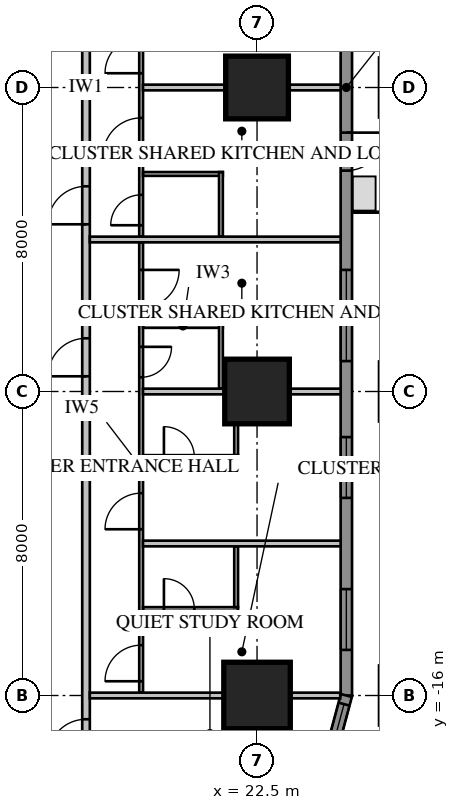
"""IFC4 building model, lengths in metres.
Left out: names, types, materials, properties, quantities, classifications, styles, units other than length and angle.
Written with IfcOpenShell. Run it as: python <this file> out.ifc"""

import sys

from ifc_helpers import new_model, si_unit, direction, frame, frame_2d, origin, origin_2d, place, context, subcontext, project, spatial, rectangle, extrude, element, fill, save


model = new_model("IFC4")
c1 = context("Model", 3, precision=1e-05, world=origin(), true_north=direction((0.0, 1.0)))
c2 = subcontext(c1, "Body", "Model", "MODEL_VIEW")
j1 = project(units=[si_unit("LENGTHUNIT", "METRE"), si_unit("PLANEANGLEUNIT", "RADIAN")], contexts=[c1])
p1 = place(None, origin())
s1 = spatial("IfcSite", under=j1, at=p1, CompositionType="ELEMENT")
p2 = place(p1, origin())
s2 = spatial("IfcBuilding", under=s1, at=p2, CompositionType="ELEMENT")
p3 = place(p2, frame((0.0, 0.0, 46.8)))
s3 = spatial("IfcBuildingStorey", under=s2, at=p3, CompositionType="ELEMENT", Elevation=46.8)
p4 = place(p3, frame((22.5, -16.0, 0.0), z_axis=(0.0, 0.0, 1.0), x_axis=(1.0, 0.0, 0.0)))
e1 = element("IfcColumn", 1, at=p4, inside=s3, PredefinedType="COLUMN", context=c2, shape_type="SweptSolid", body=[
    extrude(rectangle(XDim=1.75, YDim=1.75, at=origin_2d()), origin(), (0.0, 0.0, 1.0), 3.85),
])
p5 = place(p3, frame((22.5, -8.0, 0.0), z_axis=(0.0, 0.0, 1.0), x_axis=(1.0, 0.0, 0.0)))
e2 = element("IfcColumn", 2, at=p5, inside=s3, PredefinedType="COLUMN", context=c2, shape_type="SweptSolid", body=[
    extrude(rectangle(XDim=1.7, YDim=1.7, at=origin_2d()), origin(), (0.0, 0.0, 1.0), 3.85),
])
p6 = place(p3, frame((22.5, 0.0, 0.0), z_axis=(0.0, 0.0, 1.0), x_axis=(1.0, 0.0, 0.0)))
e3 = element("IfcColumn", 3, at=p6, inside=s3, PredefinedType="COLUMN", context=c2, shape_type="SweptSolid", body=[
    extrude(rectangle(XDim=1.65, YDim=1.65, at=origin_2d()), origin(), (0.0, 0.0, 1.0), 3.85),
])
p7 = place(p3, frame((24.85, -16.0, 0.0), z_axis=(0.0, 0.0, 1.0), x_axis=(0.0, 1.0, 0.0)))
e4 = element("IfcWall", 4, at=p7, inside=s3, PredefinedType="SOLIDWALL", context=c2, shape_type="SweptSolid", body=[
    extrude(rectangle(XDim=32.0, YDim=0.3, at=frame_2d((16.0, 0.0))), origin(), (0.0, 0.0, 1.0), 3.65),
])
p8 = place(p7, frame((1.2, 0.0, 0.75)))
e5 = element("IfcOpeningElement", 5, at=p8, cuts=e4, PredefinedType="OPENING", context=c2, shape_type="SweptSolid", body=[
    extrude(rectangle(XDim=1.6, YDim=1.8, at=frame_2d((0.8, 0.9))), frame((0.0, 0.17, 0.0), z_axis=(0.0, -1.0, 0.0), x_axis=(1.0, 0.0, 0.0)), (0.0, 0.0, 1.0), 0.34),
])
p9 = place(p7, frame((5.2, 0.0, 0.75)))
e6 = element("IfcOpeningElement", 6, at=p9, cuts=e4, PredefinedType="OPENING", context=c2, shape_type="SweptSolid", body=[
    extrude(rectangle(XDim=1.6, YDim=1.8, at=frame_2d((0.8, 0.9))), frame((0.0, 0.17, 0.0), z_axis=(0.0, -1.0, 0.0), x_axis=(1.0, 0.0, 0.0)), (0.0, 0.0, 1.0), 0.34),
])
p10 = place(p7, frame((17.2, 0.0, 0.75)))
e7 = element("IfcOpeningElement", 7, at=p10, cuts=e4, PredefinedType="OPENING", context=c2, shape_type="SweptSolid", body=[
    extrude(rectangle(XDim=1.6, YDim=1.8, at=frame_2d((0.8, 0.9))), frame((0.0, 0.17, 0.0), z_axis=(0.0, -1.0, 0.0), x_axis=(1.0, 0.0, 0.0)), (0.0, 0.0, 1.0), 0.34),
])
p11 = place(p7, frame((21.2, 0.0, 0.75)))
e8 = element("IfcOpeningElement", 8, at=p11, cuts=e4, PredefinedType="OPENING", context=c2, shape_type="SweptSolid", body=[
    extrude(rectangle(XDim=1.6, YDim=1.8, at=frame_2d((0.8, 0.9))), frame((0.0, 0.17, 0.0), z_axis=(0.0, -1.0, 0.0), x_axis=(1.0, 0.0, 0.0)), (0.0, 0.0, 1.0), 0.34),
])
p12 = place(p7, frame((25.2, 0.0, 0.75)))
e9 = element("IfcOpeningElement", 9, at=p12, cuts=e4, PredefinedType="OPENING", context=c2, shape_type="SweptSolid", body=[
    extrude(rectangle(XDim=1.6, YDim=1.8, at=frame_2d((0.8, 0.9))), frame((0.0, 0.17, 0.0), z_axis=(0.0, -1.0, 0.0), x_axis=(1.0, 0.0, 0.0)), (0.0, 0.0, 1.0), 0.34),
])
p13 = place(p7, frame((29.2, 0.0, 0.75)))
e10 = element("IfcOpeningElement", 10, at=p13, cuts=e4, PredefinedType="OPENING", context=c2, shape_type="SweptSolid", body=[
    extrude(rectangle(XDim=1.6, YDim=1.8, at=frame_2d((0.8, 0.9))), frame((0.0, 0.17, 0.0), z_axis=(0.0, -1.0, 0.0), x_axis=(1.0, 0.0, 0.0)), (0.0, 0.0, 1.0), 0.34),
])
p14 = place(p7, frame((8.8, 0.0, 0.75)))
e11 = element("IfcOpeningElement", 11, at=p14, cuts=e4, PredefinedType="OPENING", context=c2, shape_type="SweptSolid", body=[
    extrude(rectangle(XDim=2.4, YDim=1.8, at=frame_2d((1.2, 0.9))), frame((0.0, 0.17, 0.0), z_axis=(0.0, -1.0, 0.0), x_axis=(1.0, 0.0, 0.0)), (0.0, 0.0, 1.0), 0.34),
])
p15 = place(p7, frame((13.812, 0.0, 0.0)))
e12 = element("IfcOpeningElement", 12, at=p15, cuts=e4, PredefinedType="OPENING", context=c2, shape_type="SweptSolid", body=[
    extrude(rectangle(XDim=1.0, YDim=2.4, at=frame_2d((0.5, 1.2))), frame((0.0, 0.17, 0.0), z_axis=(0.0, -1.0, 0.0), x_axis=(1.0, 0.0, 0.0)), (0.0, 0.0, 1.0), 0.34),
])
p16 = place(p3, frame((23.664, -20.425, 0.0), z_axis=(0.0, 0.0, 1.0), x_axis=(0.258839972501, 0.965920218567, 0.0)))
e13 = element("IfcWall", 13, at=p16, inside=s3, PredefinedType="SOLIDWALL", context=c2, shape_type="SweptSolid", body=[
    extrude(rectangle(XDim=4.581, YDim=0.3, at=frame_2d((2.291, 0.0))), origin(), (0.0, 0.0, 1.0), 3.65),
])
p17 = place(p16, frame((2.746, 0.0, 0.75)))
e14 = element("IfcOpeningElement", 14, at=p17, cuts=e13, PredefinedType="OPENING", context=c2, shape_type="SweptSolid", body=[
    extrude(rectangle(XDim=1.6, YDim=1.8, at=frame_2d((0.8, 0.9))), frame((0.0, 0.17, 0.0), z_axis=(0.0, -1.0, 0.0), x_axis=(1.0, 0.0, 0.0)), (0.0, 0.0, 1.0), 0.34),
])
p18 = place(p3, frame((18.0, -18.0, 0.0), z_axis=(0.0, 0.0, 1.0), x_axis=(0.0, 1.0, 0.0)))
e15 = element("IfcWall", 15, at=p18, inside=s3, PredefinedType="PARTITIONING", context=c2, shape_type="SweptSolid", body=[
    extrude(rectangle(XDim=36.0, YDim=0.2, at=frame_2d((18.0, 0.0))), origin(), (0.0, 0.0, 1.0), 3.65),
])
p19 = place(p18, frame((10.4, 0.0, 0.0)))
e16 = element("IfcOpeningElement", 16, at=p19, cuts=e15, PredefinedType="OPENING", context=c2, shape_type="SweptSolid", body=[
    extrude(rectangle(XDim=1.0, YDim=2.1, at=frame_2d((0.5, 1.05))), frame((0.0, 0.12, 0.0), z_axis=(0.0, -1.0, 0.0), x_axis=(1.0, 0.0, 0.0)), (0.0, 0.0, 1.0), 0.24),
])
p20 = place(p18, frame((14.4, 0.0, 0.0)))
e17 = element("IfcOpeningElement", 17, at=p20, cuts=e15, PredefinedType="OPENING", context=c2, shape_type="SweptSolid", body=[
    extrude(rectangle(XDim=1.0, YDim=2.1, at=frame_2d((0.5, 1.05))), frame((0.0, 0.12, 0.0), z_axis=(0.0, -1.0, 0.0), x_axis=(1.0, 0.0, 0.0)), (0.0, 0.0, 1.0), 0.24),
])
p21 = place(p18, frame((0.375, 0.0, 0.0)))
e18 = element("IfcOpeningElement", 18, at=p21, cuts=e15, PredefinedType="OPENING", context=c2, shape_type="SweptSolid", body=[
    extrude(rectangle(XDim=1.0, YDim=2.1, at=frame_2d((0.5, 1.05))), frame((0.0, 0.12, 0.0), z_axis=(0.0, -1.0, 0.0), x_axis=(1.0, 0.0, 0.0)), (0.0, 0.0, 1.0), 0.24),
])
p22 = place(p18, frame((34.375, 0.0, 0.0)))
e19 = element("IfcOpeningElement", 19, at=p22, cuts=e15, PredefinedType="OPENING", context=c2, shape_type="SweptSolid", body=[
    extrude(rectangle(XDim=0.95, YDim=2.1, at=frame_2d((0.475, 1.05))), frame((0.0, 0.12, 0.0), z_axis=(0.0, -1.0, 0.0), x_axis=(1.0, 0.0, 0.0)), (0.0, 0.0, 1.0), 0.24),
])
p23 = place(p3, frame((19.45, -15.925, 0.0), z_axis=(0.0, 0.0, 1.0), x_axis=(0.0, 1.0, 0.0)))
e20 = element("IfcWall", 20, at=p23, inside=s3, PredefinedType="PARTITIONING", context=c2, shape_type="SweptSolid", body=[
    extrude(rectangle(XDim=11.85, YDim=0.1, at=frame_2d((5.925, 0.0))), origin(), (0.0, 0.0, 1.0), 3.65),
])
p24 = place(p23, frame((10.125, 0.0, 0.0)))
e21 = element("IfcOpeningElement", 21, at=p24, cuts=e20, PredefinedType="OPENING", context=c2, shape_type="SweptSolid", body=[
    extrude(rectangle(XDim=1.0, YDim=2.1, at=frame_2d((0.5, 1.05))), frame((0.0, 0.07, 0.0), z_axis=(0.0, -1.0, 0.0), x_axis=(1.0, 0.0, 0.0)), (0.0, 0.0, 1.0), 0.14),
])
p25 = place(p23, frame((8.3, 0.0, 0.0)))
e22 = element("IfcOpeningElement", 22, at=p25, cuts=e20, PredefinedType="OPENING", context=c2, shape_type="SweptSolid", body=[
    extrude(rectangle(XDim=0.8, YDim=2.1, at=frame_2d((0.4, 1.05))), frame((0.0, 0.07, 0.0), z_axis=(0.0, -1.0, 0.0), x_axis=(1.0, 0.0, 0.0)), (0.0, 0.0, 1.0), 0.14),
])
p26 = place(p23, frame((0.3, 0.0, 0.0)))
e23 = element("IfcOpeningElement", 23, at=p26, cuts=e20, PredefinedType="OPENING", context=c2, shape_type="SweptSolid", body=[
    extrude(rectangle(XDim=0.95, YDim=2.1, at=frame_2d((0.475, 1.05))), frame((0.0, 0.07, 0.0), z_axis=(0.0, -1.0, 0.0), x_axis=(1.0, 0.0, 0.0)), (0.0, 0.0, 1.0), 0.14),
])
p27 = place(p23, frame((4.3, 0.0, 0.0)))
e24 = element("IfcOpeningElement", 24, at=p27, cuts=e20, PredefinedType="OPENING", context=c2, shape_type="SweptSolid", body=[
    extrude(rectangle(XDim=0.95, YDim=2.1, at=frame_2d((0.475, 1.05))), frame((0.0, 0.07, 0.0), z_axis=(0.0, -1.0, 0.0), x_axis=(1.0, 0.0, 0.0)), (0.0, 0.0, 1.0), 0.14),
])
p28 = place(p3, frame((19.5, -6.275, 0.0), z_axis=(0.0, 0.0, 1.0), x_axis=(1.0, 0.0, 0.0)))
e25 = element("IfcWall", 25, at=p28, inside=s3, PredefinedType="PARTITIONING", context=c2, shape_type="SweptSolid", body=[
    extrude(rectangle(XDim=2.1, YDim=0.1, at=frame_2d((1.05, 0.0))), origin(), (0.0, 0.0, 1.0), 3.65),
])
p29 = place(p3, frame((21.55, -7.925, 0.0), z_axis=(0.0, 0.0, 1.0), x_axis=(0.0, 1.0, 0.0)))
e26 = element("IfcWall", 26, at=p29, inside=s3, PredefinedType="PARTITIONING", context=c2, shape_type="SweptSolid", body=[
    extrude(rectangle(XDim=1.7, YDim=0.1, at=frame_2d((0.85, 0.0))), origin(), (0.0, 0.0, 1.0), 3.65),
])
p30 = place(p3, frame((19.45, -3.925, 0.0), z_axis=(0.0, 0.0, 1.0), x_axis=(0.0, 1.0, 0.0)))
e27 = element("IfcWall", 27, at=p30, inside=s3, PredefinedType="PARTITIONING", context=c2, shape_type="SweptSolid", body=[
    extrude(rectangle(XDim=19.85, YDim=0.1, at=frame_2d((9.925, 0.0))), origin(), (0.0, 0.0, 1.0), 3.65),
])
p31 = place(p30, frame((2.125, 0.0, 0.0)))
e28 = element("IfcOpeningElement", 28, at=p31, cuts=e27, PredefinedType="OPENING", context=c2, shape_type="SweptSolid", body=[
    extrude(rectangle(XDim=1.0, YDim=2.1, at=frame_2d((0.5, 1.05))), frame((0.0, 0.07, 0.0), z_axis=(0.0, -1.0, 0.0), x_axis=(1.0, 0.0, 0.0)), (0.0, 0.0, 1.0), 0.14),
])
p32 = place(p30, frame((0.3, 0.0, 0.0)))
e29 = element("IfcOpeningElement", 29, at=p32, cuts=e27, PredefinedType="OPENING", context=c2, shape_type="SweptSolid", body=[
    extrude(rectangle(XDim=0.8, YDim=2.1, at=frame_2d((0.4, 1.05))), frame((0.0, 0.07, 0.0), z_axis=(0.0, -1.0, 0.0), x_axis=(1.0, 0.0, 0.0)), (0.0, 0.0, 1.0), 0.14),
])
p33 = place(p30, frame((4.3, 0.0, 0.0)))
e30 = element("IfcOpeningElement", 30, at=p33, cuts=e27, PredefinedType="OPENING", context=c2, shape_type="SweptSolid", body=[
    extrude(rectangle(XDim=0.95, YDim=2.1, at=frame_2d((0.475, 1.05))), frame((0.0, 0.07, 0.0), z_axis=(0.0, -1.0, 0.0), x_axis=(1.0, 0.0, 0.0)), (0.0, 0.0, 1.0), 0.14),
])
p34 = place(p30, frame((8.3, 0.0, 0.0)))
e31 = element("IfcOpeningElement", 31, at=p34, cuts=e27, PredefinedType="OPENING", context=c2, shape_type="SweptSolid", body=[
    extrude(rectangle(XDim=0.95, YDim=2.1, at=frame_2d((0.475, 1.05))), frame((0.0, 0.07, 0.0), z_axis=(0.0, -1.0, 0.0), x_axis=(1.0, 0.0, 0.0)), (0.0, 0.0, 1.0), 0.14),
])
p35 = place(p30, frame((12.3, 0.0, 0.0)))
e32 = element("IfcOpeningElement", 32, at=p35, cuts=e27, PredefinedType="OPENING", context=c2, shape_type="SweptSolid", body=[
    extrude(rectangle(XDim=0.95, YDim=2.1, at=frame_2d((0.475, 1.05))), frame((0.0, 0.07, 0.0), z_axis=(0.0, -1.0, 0.0), x_axis=(1.0, 0.0, 0.0)), (0.0, 0.0, 1.0), 0.14),
])
p36 = place(p30, frame((16.3, 0.0, 0.0)))
e33 = element("IfcOpeningElement", 33, at=p36, cuts=e27, PredefinedType="OPENING", context=c2, shape_type="SweptSolid", body=[
    extrude(rectangle(XDim=0.95, YDim=2.1, at=frame_2d((0.475, 1.05))), frame((0.0, 0.07, 0.0), z_axis=(0.0, -1.0, 0.0), x_axis=(1.0, 0.0, 0.0)), (0.0, 0.0, 1.0), 0.14),
])
p37 = place(p3, frame((19.5, -2.275, 0.0), z_axis=(0.0, 0.0, 1.0), x_axis=(1.0, 0.0, 0.0)))
e34 = element("IfcWall", 34, at=p37, inside=s3, PredefinedType="PARTITIONING", context=c2, shape_type="SweptSolid", body=[
    extrude(rectangle(XDim=2.1, YDim=0.1, at=frame_2d((1.05, 0.0))), origin(), (0.0, 0.0, 1.0), 3.65),
])
p38 = place(p3, frame((21.55, -3.925, 0.0), z_axis=(0.0, 0.0, 1.0), x_axis=(0.0, 1.0, 0.0)))
e35 = element("IfcWall", 35, at=p38, inside=s3, PredefinedType="PARTITIONING", context=c2, shape_type="SweptSolid", body=[
    extrude(rectangle(XDim=1.7, YDim=0.1, at=frame_2d((0.85, 0.0))), origin(), (0.0, 0.0, 1.0), 3.65),
])
p39 = place(p3, frame((18.1, -16.0, 0.0), z_axis=(0.0, 0.0, 1.0), x_axis=(1.0, 0.0, 0.0)))
e36 = element("IfcWall", 36, at=p39, inside=s3, PredefinedType="PARTITIONING", context=c2, shape_type="SweptSolid", body=[
    extrude(rectangle(XDim=6.589, YDim=0.15, at=frame_2d((3.295, 0.0))), origin(), (0.0, 0.0, 1.0), 3.65),
])
for number, where, z_axis, x_axis in (
    (37, (19.5, -12.0, 0.0), (0.0, 0.0, 1.0), (1.0, 0.0, 0.0)),
    (38, (19.5, -8.0, 0.0), (0.0, 0.0, 1.0), (1.0, 0.0, 0.0)),
):
    element("IfcWall", number, at=place(p3, frame(where, z_axis=z_axis, x_axis=x_axis)), inside=s3, PredefinedType="PARTITIONING", context=c2, shape_type="SweptSolid", body=[
        extrude(rectangle(XDim=5.2, YDim=0.15, at=frame_2d((2.6, 0.0))), origin(), (0.0, 0.0, 1.0), 3.65),
    ])
p40 = place(p3, frame((18.1, -4.0, 0.0), z_axis=(0.0, 0.0, 1.0), x_axis=(1.0, 0.0, 0.0)))
e39 = element("IfcWall", 39, at=p40, inside=s3, PredefinedType="PARTITIONING", context=c2, shape_type="SweptSolid", body=[
    extrude(rectangle(XDim=6.6, YDim=0.15, at=frame_2d((3.3, 0.0))), origin(), (0.0, 0.0, 1.0), 3.65),
])
p41 = place(p3, frame((19.5, 0.0, 0.0), z_axis=(0.0, 0.0, 1.0), x_axis=(1.0, 0.0, 0.0)))
e40 = element("IfcWall", 40, at=p41, inside=s3, PredefinedType="PARTITIONING", context=c2, shape_type="SweptSolid", body=[
    extrude(rectangle(XDim=5.2, YDim=0.15, at=frame_2d((2.6, 0.0))), origin(), (0.0, 0.0, 1.0), 2.957),
])
p42 = place(p3, frame((19.5, -13.725, 0.0), z_axis=(0.0, 0.0, 1.0), x_axis=(1.0, 0.0, 0.0)))
e41 = element("IfcWall", 41, at=p42, inside=s3, PredefinedType="PARTITIONING", context=c2, shape_type="SweptSolid", body=[
    extrude(rectangle(XDim=2.5, YDim=0.1, at=frame_2d((1.25, 0.0))), origin(), (0.0, 0.0, 1.0), 3.65),
])
p43 = place(p42, frame((0.55, 0.0, 0.0)))
e42 = element("IfcOpeningElement", 42, at=p43, cuts=e41, PredefinedType="OPENING", context=c2, shape_type="SweptSolid", body=[
    extrude(rectangle(XDim=0.8, YDim=2.1, at=frame_2d((0.4, 1.05))), frame((0.0, 0.07, 0.0), z_axis=(0.0, -1.0, 0.0), x_axis=(1.0, 0.0, 0.0)), (0.0, 0.0, 1.0), 0.14),
])
p44 = place(p3, frame((21.95, -13.675, 0.0), z_axis=(0.0, 0.0, 1.0), x_axis=(0.0, 1.0, 0.0)))
e43 = element("IfcWall", 43, at=p44, inside=s3, PredefinedType="PARTITIONING", context=c2, shape_type="SweptSolid", body=[
    extrude(rectangle(XDim=1.6, YDim=0.1, at=frame_2d((0.8, 0.0))), origin(), (0.0, 0.0, 1.0), 3.65),
])
p45 = place(p3, frame((19.5, -9.725, 0.0), z_axis=(0.0, 0.0, 1.0), x_axis=(1.0, 0.0, 0.0)))
e44 = element("IfcWall", 44, at=p45, inside=s3, PredefinedType="PARTITIONING", context=c2, shape_type="SweptSolid", body=[
    extrude(rectangle(XDim=2.5, YDim=0.1, at=frame_2d((1.25, 0.0))), origin(), (0.0, 0.0, 1.0), 3.65),
])
p46 = place(p45, frame((0.55, 0.0, 0.0)))
e45 = element("IfcOpeningElement", 45, at=p46, cuts=e44, PredefinedType="OPENING", context=c2, shape_type="SweptSolid", body=[
    extrude(rectangle(XDim=0.8, YDim=2.1, at=frame_2d((0.4, 1.05))), frame((0.0, 0.07, 0.0), z_axis=(0.0, -1.0, 0.0), x_axis=(1.0, 0.0, 0.0)), (0.0, 0.0, 1.0), 0.14),
])
p47 = place(p3, frame((21.95, -9.675, 0.0), z_axis=(0.0, 0.0, 1.0), x_axis=(0.0, 1.0, 0.0)))
e46 = element("IfcWall", 46, at=p47, inside=s3, PredefinedType="PARTITIONING", context=c2, shape_type="SweptSolid", body=[
    extrude(rectangle(XDim=1.6, YDim=0.1, at=frame_2d((0.8, 0.0))), origin(), (0.0, 0.0, 1.0), 3.65),
])
p48 = place(p17, origin())
e47 = element("IfcWindow", 47, at=p48, inside=s3, PartitioningType="SINGLE_PANEL", PredefinedType="WINDOW", context=c2, shape_type="SweptSolid", body=[
    extrude(rectangle(XDim=1.6, YDim=1.8, at=frame_2d((0.8, 0.9))), frame((0.0, 0.03, 0.0), z_axis=(0.0, -1.0, 0.0), x_axis=(1.0, 0.0, 0.0)), (0.0, 0.0, 1.0), 0.06),
])
fill(e14, e47)
p49 = place(p8, origin())
e48 = element("IfcWindow", 48, at=p49, inside=s3, PartitioningType="SINGLE_PANEL", PredefinedType="WINDOW", context=c2, shape_type="SweptSolid", body=[
    extrude(rectangle(XDim=1.6, YDim=1.8, at=frame_2d((0.8, 0.9))), frame((0.0, 0.03, 0.0), z_axis=(0.0, -1.0, 0.0), x_axis=(1.0, 0.0, 0.0)), (0.0, 0.0, 1.0), 0.06),
])
fill(e5, e48)
p50 = place(p9, origin())
e49 = element("IfcWindow", 49, at=p50, inside=s3, PartitioningType="SINGLE_PANEL", PredefinedType="WINDOW", context=c2, shape_type="SweptSolid", body=[
    extrude(rectangle(XDim=1.6, YDim=1.8, at=frame_2d((0.8, 0.9))), frame((0.0, 0.03, 0.0), z_axis=(0.0, -1.0, 0.0), x_axis=(1.0, 0.0, 0.0)), (0.0, 0.0, 1.0), 0.06),
])
fill(e6, e49)
p51 = place(p14, origin())
e50 = element("IfcWindow", 50, at=p51, inside=s3, PartitioningType="SINGLE_PANEL", PredefinedType="WINDOW", context=c2, shape_type="SweptSolid", body=[
    extrude(rectangle(XDim=2.4, YDim=1.8, at=frame_2d((1.2, 0.9))), frame((0.0, 0.03, 0.0), z_axis=(0.0, -1.0, 0.0), x_axis=(1.0, 0.0, 0.0)), (0.0, 0.0, 1.0), 0.06),
])
fill(e11, e50)
p52 = place(p15, origin())
e51 = element("IfcDoor", 51, at=p52, inside=s3, OperationType="SINGLE_SWING_RIGHT", PredefinedType="DOOR", context=c2, shape_type="SweptSolid", body=[
    extrude(rectangle(XDim=1.0, YDim=2.4, at=frame_2d((0.5, 1.2))), frame((0.0, 0.025, 0.0), z_axis=(0.0, -1.0, 0.0), x_axis=(1.0, 0.0, 0.0)), (0.0, 0.0, 1.0), 0.05),
])
fill(e12, e51)
p53 = place(p19, origin())
e52 = element("IfcDoor", 52, at=p53, inside=s3, OperationType="SINGLE_SWING_LEFT", PredefinedType="DOOR", context=c2, shape_type="SweptSolid", body=[
    extrude(rectangle(XDim=1.0, YDim=2.1, at=frame_2d((0.5, 1.05))), frame((0.0, 0.025, 0.0), z_axis=(0.0, -1.0, 0.0), x_axis=(1.0, 0.0, 0.0)), (0.0, 0.0, 1.0), 0.05),
])
fill(e16, e52)
p54 = place(p24, origin())
e53 = element("IfcDoor", 53, at=p54, inside=s3, OperationType="SINGLE_SWING_RIGHT", PredefinedType="DOOR", context=c2, shape_type="SweptSolid", body=[
    extrude(rectangle(XDim=1.0, YDim=2.1, at=frame_2d((0.5, 1.05))), frame((0.0, 0.025, 0.0), z_axis=(0.0, -1.0, 0.0), x_axis=(1.0, 0.0, 0.0)), (0.0, 0.0, 1.0), 0.05),
])
fill(e21, e53)
p55 = place(p25, origin())
e54 = element("IfcDoor", 54, at=p55, inside=s3, OperationType="SINGLE_SWING_RIGHT", PredefinedType="DOOR", context=c2, shape_type="SweptSolid", body=[
    extrude(rectangle(XDim=0.8, YDim=2.1, at=frame_2d((0.4, 1.05))), frame((0.0, 0.025, 0.0), z_axis=(0.0, -1.0, 0.0), x_axis=(1.0, 0.0, 0.0)), (0.0, 0.0, 1.0), 0.05),
])
fill(e22, e54)
p56 = place(p20, origin())
e55 = element("IfcDoor", 55, at=p56, inside=s3, OperationType="SINGLE_SWING_LEFT", PredefinedType="DOOR", context=c2, shape_type="SweptSolid", body=[
    extrude(rectangle(XDim=1.0, YDim=2.1, at=frame_2d((0.5, 1.05))), frame((0.0, 0.025, 0.0), z_axis=(0.0, -1.0, 0.0), x_axis=(1.0, 0.0, 0.0)), (0.0, 0.0, 1.0), 0.05),
])
fill(e17, e55)
p57 = place(p31, origin())
e56 = element("IfcDoor", 56, at=p57, inside=s3, OperationType="SINGLE_SWING_LEFT", PredefinedType="DOOR", context=c2, shape_type="SweptSolid", body=[
    extrude(rectangle(XDim=1.0, YDim=2.1, at=frame_2d((0.5, 1.05))), frame((0.0, 0.025, 0.0), z_axis=(0.0, -1.0, 0.0), x_axis=(1.0, 0.0, 0.0)), (0.0, 0.0, 1.0), 0.05),
])
fill(e28, e56)
p58 = place(p32, origin())
e57 = element("IfcDoor", 57, at=p58, inside=s3, OperationType="SINGLE_SWING_LEFT", PredefinedType="DOOR", context=c2, shape_type="SweptSolid", body=[
    extrude(rectangle(XDim=0.8, YDim=2.1, at=frame_2d((0.4, 1.05))), frame((0.0, 0.025, 0.0), z_axis=(0.0, -1.0, 0.0), x_axis=(1.0, 0.0, 0.0)), (0.0, 0.0, 1.0), 0.05),
])
fill(e29, e57)
p59 = place(p21, origin())
e58 = element("IfcDoor", 58, at=p59, inside=s3, OperationType="SINGLE_SWING_LEFT", PredefinedType="DOOR", context=c2, shape_type="SweptSolid", body=[
    extrude(rectangle(XDim=1.0, YDim=2.1, at=frame_2d((0.5, 1.05))), frame((0.0, 0.025, 0.0), z_axis=(0.0, -1.0, 0.0), x_axis=(1.0, 0.0, 0.0)), (0.0, 0.0, 1.0), 0.05),
])
fill(e18, e58)
p60 = place(p26, origin())
e59 = element("IfcDoor", 59, at=p60, inside=s3, OperationType="SINGLE_SWING_LEFT", PredefinedType="DOOR", context=c2, shape_type="SweptSolid", body=[
    extrude(rectangle(XDim=0.95, YDim=2.1, at=frame_2d((0.475, 1.05))), frame((0.0, 0.025, 0.0), z_axis=(0.0, -1.0, 0.0), x_axis=(1.0, 0.0, 0.0)), (0.0, 0.0, 1.0), 0.05),
])
fill(e23, e59)
p61 = place(p43, origin())
e60 = element("IfcDoor", 60, at=p61, inside=s3, OperationType="SINGLE_SWING_LEFT", PredefinedType="DOOR", context=c2, shape_type="SweptSolid", body=[
    extrude(rectangle(XDim=0.8, YDim=2.1, at=frame_2d((0.4, 1.05))), frame((0.0, 0.025, 0.0), z_axis=(0.0, -1.0, 0.0), x_axis=(1.0, 0.0, 0.0)), (0.0, 0.0, 1.0), 0.05),
])
fill(e42, e60)
p62 = place(p27, origin())
e61 = element("IfcDoor", 61, at=p62, inside=s3, OperationType="SINGLE_SWING_LEFT", PredefinedType="DOOR", context=c2, shape_type="SweptSolid", body=[
    extrude(rectangle(XDim=0.95, YDim=2.1, at=frame_2d((0.475, 1.05))), frame((0.0, 0.025, 0.0), z_axis=(0.0, -1.0, 0.0), x_axis=(1.0, 0.0, 0.0)), (0.0, 0.0, 1.0), 0.05),
])
fill(e24, e61)
p63 = place(p46, origin())
e62 = element("IfcDoor", 62, at=p63, inside=s3, OperationType="SINGLE_SWING_LEFT", PredefinedType="DOOR", context=c2, shape_type="SweptSolid", body=[
    extrude(rectangle(XDim=0.8, YDim=2.1, at=frame_2d((0.4, 1.05))), frame((0.0, 0.025, 0.0), z_axis=(0.0, -1.0, 0.0), x_axis=(1.0, 0.0, 0.0)), (0.0, 0.0, 1.0), 0.05),
])
fill(e45, e62)
p64 = place(p33, origin())
e63 = element("IfcDoor", 63, at=p64, inside=s3, OperationType="SINGLE_SWING_LEFT", PredefinedType="DOOR", context=c2, shape_type="SweptSolid", body=[
    extrude(rectangle(XDim=0.95, YDim=2.1, at=frame_2d((0.475, 1.05))), frame((0.0, 0.025, 0.0), z_axis=(0.0, -1.0, 0.0), x_axis=(1.0, 0.0, 0.0)), (0.0, 0.0, 1.0), 0.05),
])
fill(e30, e63)
save(model, sys.argv[1])
